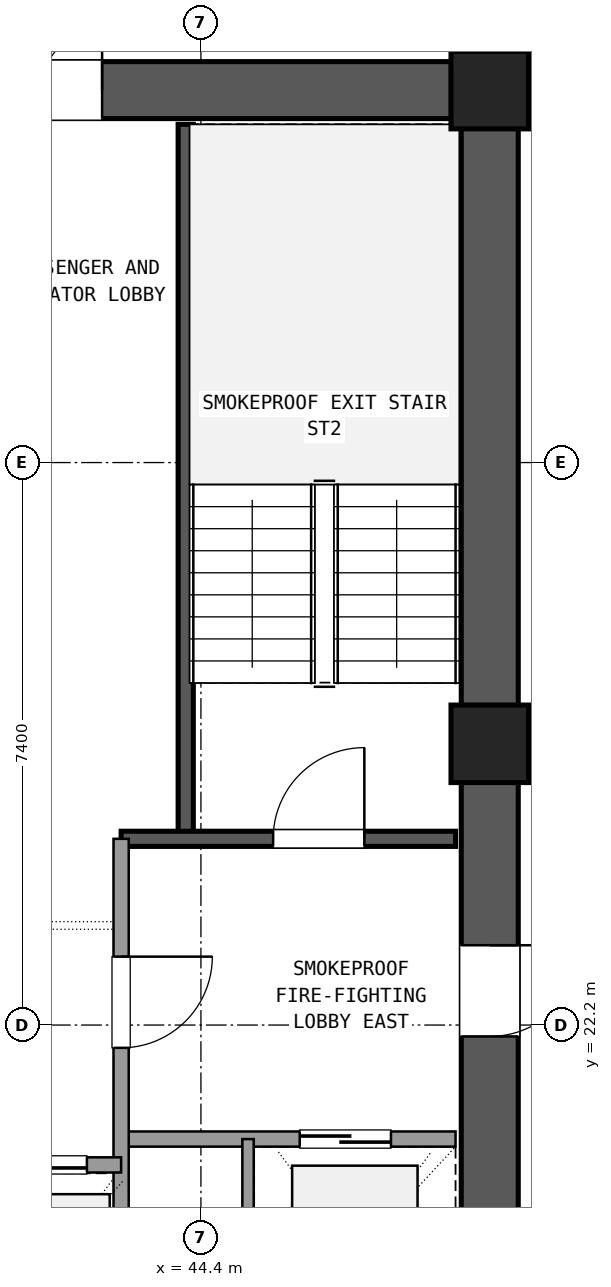
"""IFC4 building model, lengths in metres.
Left out: names, types, materials, properties, quantities, classifications, styles, units other than length and angle.
Written with IfcOpenShell. Run it as: python <this file> out.ifc"""

import sys

from ifc_helpers import new_model, si_unit, direction, frame, frame_2d, origin, origin_2d, place, context, subcontext, project, spatial, rectangle, extrude, element, fill, save


model = new_model("IFC4")
c1 = context("Model", 3, precision=1e-05, world=origin(), true_north=direction((0.0, 1.0)))
c2 = subcontext(c1, "Body", "Model", "MODEL_VIEW")
j1 = project(units=[si_unit("LENGTHUNIT", "METRE"), si_unit("PLANEANGLEUNIT", "RADIAN")], contexts=[c1])
p1 = place(None, origin())
s1 = spatial("IfcSite", under=j1, at=p1, CompositionType="ELEMENT")
p2 = place(p1, origin())
s2 = spatial("IfcBuilding", under=s1, at=p2, CompositionType="ELEMENT")
p3 = place(p2, frame((0.0, 0.0, 167.22)))
s3 = spatial("IfcBuildingStorey", under=s2, at=p3, CompositionType="ELEMENT", Elevation=167.22)
for number, where, z_axis, x_axis in (
    (1, (48.2, 25.9, 0.0), (0.0, 0.0, 1.0), (1.0, 0.0, 0.0)),
    (2, (48.2, 34.5, 0.0), (0.0, 0.0, 1.0), (1.0, 0.0, 0.0)),
):
    element("IfcColumn", number, at=place(p3, frame(where, z_axis=z_axis, x_axis=x_axis)), inside=s3, PredefinedType="COLUMN", context=c2, shape_type="SweptSolid", body=[
        extrude(rectangle(XDim=1.02, YDim=1.02, at=origin_2d()), origin(), (0.0, 0.0, 1.0), 3.6),
    ])
p4 = place(p3, frame((48.2, 17.805, 0.0), z_axis=(0.0, 0.0, 1.0), x_axis=(0.0, 1.0, 0.0)))
e3 = element("IfcWall", 3, at=p4, inside=s3, PredefinedType="SHEAR", context=c2, shape_type="SweptSolid", body=[
    extrude(rectangle(XDim=7.59, YDim=0.75, at=frame_2d((3.795, 0.0))), origin(), (0.0, 0.0, 1.0), 3.32),
])
p5 = place(p4, frame((4.245, 0.0, 0.0)))
e4 = element("IfcOpeningElement", 4, at=p5, cuts=e3, PredefinedType="OPENING", context=c2, shape_type="SweptSolid", body=[
    extrude(rectangle(XDim=1.2, YDim=2.15, at=frame_2d((0.6, 1.075))), frame((0.0, 0.385, 0.0), z_axis=(0.0, -1.0, 0.0), x_axis=(1.0, 0.0, 0.0)), (0.0, 0.0, 1.0), 0.77),
])
p6 = place(p3, frame((48.2, 26.405, 0.0), z_axis=(0.0, 0.0, 1.0), x_axis=(0.0, 1.0, 0.0)))
e5 = element("IfcWall", 5, at=p6, inside=s3, PredefinedType="SHEAR", context=c2, shape_type="SweptSolid", body=[
    extrude(rectangle(XDim=7.59, YDim=0.75, at=frame_2d((3.795, 0.0))), origin(), (0.0, 0.0, 1.0), 3.32),
])
p7 = place(p3, frame((47.695, 34.5, 0.0), z_axis=(0.0, 0.0, 1.0), x_axis=(-1.0, 0.0, 0.0)))
e6 = element("IfcWall", 6, at=p7, inside=s3, PredefinedType="SHEAR", context=c2, shape_type="SweptSolid", body=[
    extrude(rectangle(XDim=10.19, YDim=0.75, at=frame_2d((5.095, 0.0))), origin(), (0.0, 0.0, 1.0), 3.32),
])
p8 = place(p7, frame((4.595, 0.0, 0.0)))
e7 = element("IfcOpeningElement", 7, at=p8, cuts=e6, PredefinedType="OPENING", context=c2, shape_type="SweptSolid", body=[
    extrude(rectangle(XDim=1.6, YDim=2.2, at=frame_2d((0.8, 1.1))), frame((0.0, 0.385, 0.0), z_axis=(0.0, -1.0, 0.0), x_axis=(1.0, 0.0, 0.0)), (0.0, 0.0, 1.0), 0.77),
])
p9 = place(p3, frame((44.2, 24.65, 0.0), z_axis=(0.0, 0.0, 1.0), x_axis=(0.0, 1.0, 0.0)))
e8 = element("IfcWall", 8, at=p9, inside=s3, PredefinedType="SHEAR", context=c2, shape_type="SweptSolid", body=[
    extrude(rectangle(XDim=9.4, YDim=0.2, at=frame_2d((4.7, 0.0))), origin(), (0.0, 0.0, 1.0), 3.32),
])
p10 = place(p3, frame((43.35, 24.65, 0.0), z_axis=(0.0, 0.0, 1.0), x_axis=(1.0, 0.0, 0.0)))
e9 = element("IfcWall", 9, at=p10, inside=s3, PredefinedType="SHEAR", context=c2, shape_type="SweptSolid", body=[
    extrude(rectangle(XDim=4.4, YDim=0.2, at=frame_2d((2.2, 0.0))), origin(), (0.0, 0.0, 1.0), 3.32),
])
p11 = place(p10, frame((2.0, 0.0, 0.0)))
e10 = element("IfcOpeningElement", 10, at=p11, cuts=e9, PredefinedType="OPENING", context=c2, shape_type="SweptSolid", body=[
    extrude(rectangle(XDim=1.2, YDim=2.15, at=frame_2d((0.6, 1.075))), frame((0.0, 0.11, 0.0), z_axis=(0.0, -1.0, 0.0), x_axis=(1.0, 0.0, 0.0)), (0.0, 0.0, 1.0), 0.22),
])
p12 = place(p3, frame((43.35, 20.7, 0.0), z_axis=(0.0, 0.0, 1.0), x_axis=(1.0, 0.0, 0.0)))
e11 = element("IfcWall", 11, at=p12, inside=s3, PredefinedType="SOLIDWALL", context=c2, shape_type="SweptSolid", body=[
    extrude(rectangle(XDim=4.4, YDim=0.2, at=frame_2d((2.2, 0.0))), origin(), (0.0, 0.0, 1.0), 2.61),
])
p13 = place(p12, frame((2.35, 0.0, 0.0)))
e12 = element("IfcOpeningElement", 12, at=p13, cuts=e11, PredefinedType="OPENING", context=c2, shape_type="SweptSolid", body=[
    extrude(rectangle(XDim=1.2, YDim=2.15, at=frame_2d((0.6, 1.075))), frame((0.0, 0.11, 0.0), z_axis=(0.0, -1.0, 0.0), x_axis=(1.0, 0.0, 0.0)), (0.0, 0.0, 1.0), 0.22),
])
p14 = place(p3, frame((43.35, 17.75, 0.0), z_axis=(0.0, 0.0, 1.0), x_axis=(0.0, 1.0, 0.0)))
e13 = element("IfcWall", 13, at=p14, inside=s3, PredefinedType="SOLIDWALL", context=c2, shape_type="SweptSolid", body=[
    extrude(rectangle(XDim=6.9, YDim=0.2, at=frame_2d((3.45, 0.0))), origin(), (0.0, 0.0, 1.0), 2.61),
])
p15 = place(p14, frame((4.15, 0.0, 0.0)))
e14 = element("IfcOpeningElement", 14, at=p15, cuts=e13, PredefinedType="OPENING", context=c2, shape_type="SweptSolid", body=[
    extrude(rectangle(XDim=1.2, YDim=2.15, at=frame_2d((0.6, 1.075))), frame((0.0, 0.11, 0.0), z_axis=(0.0, -1.0, 0.0), x_axis=(1.0, 0.0, 0.0)), (0.0, 0.0, 1.0), 0.22),
])
p16 = place(p3, frame((45.02, 17.75, 0.0), z_axis=(0.0, 0.0, 1.0), x_axis=(0.0, 1.0, 0.0)))
e15 = element("IfcWall", 15, at=p16, inside=s3, PredefinedType="PARTITIONING", context=c2, shape_type="SweptSolid", body=[
    extrude(rectangle(XDim=2.95, YDim=0.15, at=frame_2d((1.475, 0.0))), origin(), (0.0, 0.0, 1.0), 2.61),
])
p17 = place(p3, frame((37.25, 20.36, 0.0), z_axis=(0.0, 0.0, 1.0), x_axis=(1.0, 0.0, 0.0)))
e16 = element("IfcWall", 16, at=p17, inside=s3, PredefinedType="SOLIDWALL", context=c2, shape_type="SweptSolid", body=[
    extrude(rectangle(XDim=6.1, YDim=0.2, at=frame_2d((3.05, 0.0))), origin(), (0.0, 0.0, 1.0), 2.61),
])
p18 = place(p17, frame((0.45, 0.0, 0.0)))
e17 = element("IfcOpeningElement", 17, at=p18, cuts=e16, PredefinedType="OPENING", context=c2, shape_type="SweptSolid", body=[
    extrude(rectangle(XDim=1.1, YDim=2.15, at=frame_2d((0.55, 1.075))), frame((0.0, 0.11, 0.0), z_axis=(0.0, -1.0, 0.0), x_axis=(1.0, 0.0, 0.0)), (0.0, 0.0, 1.0), 0.22),
])
p19 = place(p17, frame((2.5, 0.0, 0.0)))
e18 = element("IfcOpeningElement", 18, at=p19, cuts=e16, PredefinedType="OPENING", context=c2, shape_type="SweptSolid", body=[
    extrude(rectangle(XDim=1.1, YDim=2.15, at=frame_2d((0.55, 1.075))), frame((0.0, 0.11, 0.0), z_axis=(0.0, -1.0, 0.0), x_axis=(1.0, 0.0, 0.0)), (0.0, 0.0, 1.0), 0.22),
])
p20 = place(p17, frame((4.55, 0.0, 0.0)))
e19 = element("IfcOpeningElement", 19, at=p20, cuts=e16, PredefinedType="OPENING", context=c2, shape_type="SweptSolid", body=[
    extrude(rectangle(XDim=1.1, YDim=2.15, at=frame_2d((0.55, 1.075))), frame((0.0, 0.11, 0.0), z_axis=(0.0, -1.0, 0.0), x_axis=(1.0, 0.0, 0.0)), (0.0, 0.0, 1.0), 0.22),
])
p21 = place(p11, origin())
e20 = element("IfcDoor", 20, at=p21, inside=s3, OperationType="SINGLE_SWING_RIGHT", PredefinedType="DOOR", context=c2, shape_type="SweptSolid", body=[
    extrude(rectangle(XDim=1.2, YDim=2.15, at=frame_2d((0.6, 1.075))), frame((0.0, 0.025, 0.0), z_axis=(0.0, -1.0, 0.0), x_axis=(1.0, 0.0, 0.0)), (0.0, 0.0, 1.0), 0.05),
])
fill(e10, e20)
p22 = place(p13, origin())
e21 = element("IfcDoor", 21, at=p22, inside=s3, OperationType="SLIDING_TO_RIGHT", PredefinedType="DOOR", context=c2, shape_type="SweptSolid", body=[
    extrude(rectangle(XDim=1.2, YDim=2.15, at=frame_2d((0.6, 1.075))), frame((0.0, 0.025, 0.0), z_axis=(0.0, -1.0, 0.0), x_axis=(1.0, 0.0, 0.0)), (0.0, 0.0, 1.0), 0.05),
])
fill(e12, e21)
p23 = place(p15, frame((1.2, 0.0, 0.0), z_axis=(0.0, 0.0, 1.0), x_axis=(-1.0, 0.0, 0.0)))
e22 = element("IfcDoor", 22, at=p23, inside=s3, OperationType="SINGLE_SWING_RIGHT", PredefinedType="DOOR", context=c2, shape_type="SweptSolid", body=[
    extrude(rectangle(XDim=1.2, YDim=2.15, at=frame_2d((0.6, 1.075))), frame((0.0, 0.025, 0.0), z_axis=(0.0, -1.0, 0.0), x_axis=(1.0, 0.0, 0.0)), (0.0, 0.0, 1.0), 0.05),
])
fill(e14, e22)
p24 = place(p5, frame((1.2, 0.0, 0.0), z_axis=(0.0, 0.0, 1.0), x_axis=(-1.0, 0.0, 0.0)))
e23 = element("IfcDoor", 23, at=p24, inside=s3, OperationType="SINGLE_SWING_RIGHT", PredefinedType="DOOR", context=c2, shape_type="SweptSolid", body=[
    extrude(rectangle(XDim=1.2, YDim=2.15, at=frame_2d((0.6, 1.075))), frame((0.0, 0.025, 0.0), z_axis=(0.0, -1.0, 0.0), x_axis=(1.0, 0.0, 0.0)), (0.0, 0.0, 1.0), 0.05),
])
fill(e4, e23)
p25 = place(p8, frame((1.6, 0.0, 0.0), z_axis=(0.0, 0.0, 1.0), x_axis=(-1.0, 0.0, 0.0)))
e24 = element("IfcDoor", 24, at=p25, inside=s3, OperationType="DOUBLE_DOOR_SINGLE_SWING", PredefinedType="DOOR", context=c2, shape_type="SweptSolid", body=[
    extrude(rectangle(XDim=1.6, YDim=2.2, at=frame_2d((0.8, 1.1))), frame((0.0, 0.025, 0.0), z_axis=(0.0, -1.0, 0.0), x_axis=(1.0, 0.0, 0.0)), (0.0, 0.0, 1.0), 0.05),
])
fill(e7, e24)
p26 = place(p20, origin())
e25 = element("IfcDoor", 25, at=p26, inside=s3, OperationType="SLIDING_TO_LEFT", PredefinedType="DOOR", context=c2, shape_type="SweptSolid", body=[
    extrude(rectangle(XDim=1.1, YDim=2.15, at=frame_2d((0.55, 1.075))), frame((0.0, 0.025, 0.0), z_axis=(0.0, -1.0, 0.0), x_axis=(1.0, 0.0, 0.0)), (0.0, 0.0, 1.0), 0.05),
])
fill(e19, e25)
save(model, sys.argv[1])
